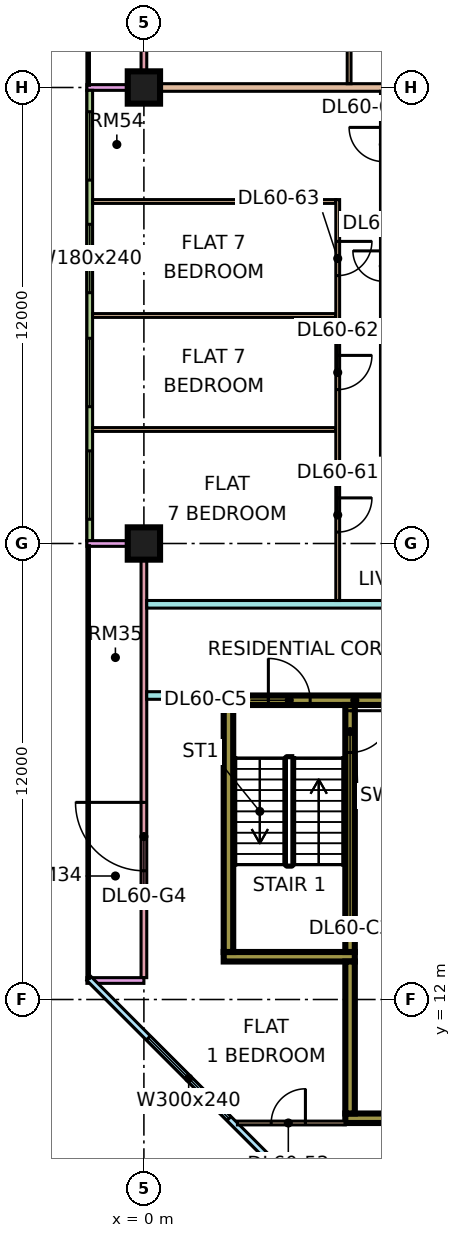
"""IFC4 building model, lengths in metres.
Left out: names, types, materials, properties, quantities, classifications, styles, units other than length and angle.
Written with IfcOpenShell. Run it as: python <this file> out.ifc"""

import sys

from ifc_helpers import new_model, si_unit, direction, frame, frame_2d, origin, origin_2d, place, context, subcontext, project, spatial, rectangle, extrude, element, fill, save


model = new_model("IFC4")
c1 = context("Model", 3, precision=1e-05, world=origin(), true_north=direction((0.0, 1.0)))
c2 = subcontext(c1, "Body", "Model", "MODEL_VIEW")
j1 = project(units=[si_unit("LENGTHUNIT", "METRE"), si_unit("PLANEANGLEUNIT", "RADIAN")], contexts=[c1])
p1 = place(None, origin())
s1 = spatial("IfcSite", under=j1, at=p1, CompositionType="ELEMENT")
p2 = place(p1, origin())
s2 = spatial("IfcBuilding", under=s1, at=p2, CompositionType="ELEMENT")
p3 = place(p2, frame((0.0, 0.0, 252.9)))
s3 = spatial("IfcBuildingStorey", under=s2, at=p3, CompositionType="ELEMENT", Elevation=252.9)
p4 = place(p3, frame((0.0, 24.0, 0.0), z_axis=(0.0, 0.0, 1.0), x_axis=(1.0, 0.0, 0.0)))
e1 = element("IfcColumn", 1, at=p4, inside=s3, PredefinedType="COLUMN", context=c2, shape_type="SweptSolid", body=[
    extrude(rectangle(XDim=0.85, YDim=0.85, at=origin_2d()), origin(), (0.0, 0.0, 1.0), 3.75),
])
p5 = place(p3, frame((0.0, 36.0, 0.0), z_axis=(0.0, 0.0, 1.0), x_axis=(1.0, 0.0, 0.0)))
e2 = element("IfcColumn", 2, at=p5, inside=s3, PredefinedType="COLUMN", context=c2, shape_type="SweptSolid", body=[
    extrude(rectangle(XDim=0.85, YDim=0.85, at=origin_2d()), origin(), (0.0, 0.0, 1.0), 3.75),
])
p6 = place(p3, frame((2.1, 19.875, 0.0), z_axis=(0.0, 0.0, 1.0), x_axis=(1.0, 0.0, 0.0)))
e3 = element("IfcWall", 3, at=p6, inside=s3, PredefinedType="SHEAR", context=c2, shape_type="SweptSolid", body=[
    extrude(rectangle(XDim=6.9, YDim=0.25, at=frame_2d((3.45, 0.0))), origin(), (0.0, 0.0, 1.0), 3.75),
])
p7 = place(p6, frame((1.175, 0.0, 0.0)))
e4 = element("IfcOpeningElement", 4, at=p7, cuts=e3, PredefinedType="OPENING", context=c2, shape_type="SweptSolid", body=[
    extrude(rectangle(XDim=1.1, YDim=2.2, at=frame_2d((0.55, 1.1))), frame((0.0, 0.135, 0.0), z_axis=(0.0, -1.0, 0.0), x_axis=(1.0, 0.0, 0.0)), (0.0, 0.0, 1.0), 0.27),
])
p8 = place(p6, frame((4.6, 0.0, 0.0)))
e5 = element("IfcOpeningElement", 5, at=p8, cuts=e3, PredefinedType="OPENING", context=c2, shape_type="SweptSolid", body=[
    extrude(rectangle(XDim=1.2, YDim=2.2, at=frame_2d((0.6, 1.1))), frame((0.0, 0.135, 0.0), z_axis=(0.0, -1.0, 0.0), x_axis=(1.0, 0.0, 0.0)), (0.0, 0.0, 1.0), 0.27),
])
p9 = place(p3, frame((2.1, 13.125, 0.0), z_axis=(0.0, 0.0, 1.0), x_axis=(1.0, 0.0, 0.0)))
e6 = element("IfcWall", 6, at=p9, inside=s3, PredefinedType="SHEAR", context=c2, shape_type="SweptSolid", body=[
    extrude(rectangle(XDim=3.45, YDim=0.25, at=frame_2d((1.725, 0.0))), origin(), (0.0, 0.0, 1.0), 3.75),
])
p10 = place(p3, frame((2.225, 13.25, 0.0), z_axis=(0.0, 0.0, 1.0), x_axis=(0.0, 1.0, 0.0)))
e7 = element("IfcWall", 7, at=p10, inside=s3, PredefinedType="SHEAR", context=c2, shape_type="SweptSolid", body=[
    extrude(rectangle(XDim=6.5, YDim=0.25, at=frame_2d((3.25, 0.0))), origin(), (0.0, 0.0, 1.0), 3.75),
])
p11 = place(p3, frame((5.425, 13.25, 0.0), z_axis=(0.0, 0.0, 1.0), x_axis=(0.0, 1.0, 0.0)))
e8 = element("IfcWall", 8, at=p11, inside=s3, PredefinedType="SHEAR", context=c2, shape_type="SweptSolid", body=[
    extrude(rectangle(XDim=6.5, YDim=0.25, at=frame_2d((3.25, 0.0))), origin(), (0.0, 0.0, 1.0), 3.75),
])
p12 = place(p11, frame((5.25, 0.0, 0.0)))
e9 = element("IfcOpeningElement", 9, at=p12, cuts=e8, PredefinedType="OPENING", context=c2, shape_type="SweptSolid", body=[
    extrude(rectangle(XDim=1.1, YDim=2.2, at=frame_2d((0.55, 1.1))), frame((0.0, 0.135, 0.0), z_axis=(0.0, -1.0, 0.0), x_axis=(1.0, 0.0, 0.0)), (0.0, 0.0, 1.0), 0.27),
])
p13 = place(p3, frame((5.3, 8.875, 0.0), z_axis=(0.0, 0.0, 1.0), x_axis=(1.0, 0.0, 0.0)))
e10 = element("IfcWall", 10, at=p13, inside=s3, PredefinedType="SHEAR", context=c2, shape_type="SweptSolid", body=[
    extrude(rectangle(XDim=3.7, YDim=0.25, at=frame_2d((1.85, 0.0))), origin(), (0.0, 0.0, 1.0), 3.75),
])
p14 = place(p3, frame((5.425, 9.0, 0.0), z_axis=(0.0, 0.0, 1.0), x_axis=(0.0, 1.0, 0.0)))
e11 = element("IfcWall", 11, at=p14, inside=s3, PredefinedType="SHEAR", context=c2, shape_type="SweptSolid", body=[
    extrude(rectangle(XDim=4.0, YDim=0.25, at=frame_2d((2.0, 0.0))), origin(), (0.0, 0.0, 1.0), 3.75),
])
p15 = place(p3, frame((0.0, 47.925, 0.0), z_axis=(0.0, 0.0, 1.0), x_axis=(0.0, -1.0, 0.0)))
e12 = element("IfcWall", 12, at=p15, inside=s3, PredefinedType="SOLIDWALL", context=c2, shape_type="SweptSolid", body=[
    extrude(rectangle(XDim=11.85, YDim=0.15, at=frame_2d((5.925, 0.0))), origin(), (0.0, 0.0, 1.0), 3.3),
])
p16 = place(p15, frame((0.6, 0.0, 0.45)))
e13 = element("IfcOpeningElement", 13, at=p16, cuts=e12, PredefinedType="OPENING", context=c2, shape_type="SweptSolid", body=[
    extrude(rectangle(XDim=1.2, YDim=2.4, at=frame_2d((0.6, 1.2))), frame((0.0, 0.085, 0.0), z_axis=(0.0, -1.0, 0.0), x_axis=(1.0, 0.0, 0.0)), (0.0, 0.0, 1.0), 0.17),
])
p17 = place(p15, frame((4.087, 0.0, 0.0)))
e14 = element("IfcOpeningElement", 14, at=p17, cuts=e12, PredefinedType="OPENING", context=c2, shape_type="SweptSolid", body=[
    extrude(rectangle(XDim=1.2, YDim=2.4, at=frame_2d((0.6, 1.2))), frame((0.0, 0.085, 0.0), z_axis=(0.0, -1.0, 0.0), x_axis=(1.0, 0.0, 0.0)), (0.0, 0.0, 1.0), 0.17),
])
p18 = place(p15, frame((6.525, 0.0, 0.45)))
e15 = element("IfcOpeningElement", 15, at=p18, cuts=e12, PredefinedType="OPENING", context=c2, shape_type="SweptSolid", body=[
    extrude(rectangle(XDim=1.8, YDim=2.4, at=frame_2d((0.9, 1.2))), frame((0.0, 0.085, 0.0), z_axis=(0.0, -1.0, 0.0), x_axis=(1.0, 0.0, 0.0)), (0.0, 0.0, 1.0), 0.17),
])
p19 = place(p15, frame((9.562, 0.0, 0.45)))
e16 = element("IfcOpeningElement", 16, at=p19, cuts=e12, PredefinedType="OPENING", context=c2, shape_type="SweptSolid", body=[
    extrude(rectangle(XDim=1.2, YDim=2.4, at=frame_2d((0.6, 1.2))), frame((0.0, 0.085, 0.0), z_axis=(0.0, -1.0, 0.0), x_axis=(1.0, 0.0, 0.0)), (0.0, 0.0, 1.0), 0.17),
])
p20 = place(p3, frame((-1.5, 36.0, 0.0), z_axis=(0.0, 0.0, 1.0), x_axis=(1.0, 0.0, 0.0)))
e17 = element("IfcWall", 17, at=p20, inside=s3, PredefinedType="SOLIDWALL", context=c2, shape_type="SweptSolid", body=[
    extrude(rectangle(XDim=1.5, YDim=0.15, at=frame_2d((0.75, 0.0))), origin(), (0.0, 0.0, 1.0), 3.3),
])
p21 = place(p3, frame((-1.425, 35.925, 0.0), z_axis=(0.0, 0.0, 1.0), x_axis=(0.0, -1.0, 0.0)))
e18 = element("IfcWall", 18, at=p21, inside=s3, PredefinedType="SOLIDWALL", context=c2, shape_type="SweptSolid", body=[
    extrude(rectangle(XDim=11.85, YDim=0.15, at=frame_2d((5.925, 0.0))), origin(), (0.0, 0.0, 1.0), 3.3),
])
p22 = place(p21, frame((0.562, 0.0, 0.45)))
e19 = element("IfcOpeningElement", 19, at=p22, cuts=e18, PredefinedType="OPENING", context=c2, shape_type="SweptSolid", body=[
    extrude(rectangle(XDim=1.8, YDim=2.4, at=frame_2d((0.9, 1.2))), frame((0.0, 0.085, 0.0), z_axis=(0.0, -1.0, 0.0), x_axis=(1.0, 0.0, 0.0)), (0.0, 0.0, 1.0), 0.17),
])
p23 = place(p21, frame((3.525, 0.0, 0.45)))
e20 = element("IfcOpeningElement", 20, at=p23, cuts=e18, PredefinedType="OPENING", context=c2, shape_type="SweptSolid", body=[
    extrude(rectangle(XDim=1.8, YDim=2.4, at=frame_2d((0.9, 1.2))), frame((0.0, 0.085, 0.0), z_axis=(0.0, -1.0, 0.0), x_axis=(1.0, 0.0, 0.0)), (0.0, 0.0, 1.0), 0.17),
])
p24 = place(p21, frame((6.525, 0.0, 0.45)))
e21 = element("IfcOpeningElement", 21, at=p24, cuts=e18, PredefinedType="OPENING", context=c2, shape_type="SweptSolid", body=[
    extrude(rectangle(XDim=1.8, YDim=2.4, at=frame_2d((0.9, 1.2))), frame((0.0, 0.085, 0.0), z_axis=(0.0, -1.0, 0.0), x_axis=(1.0, 0.0, 0.0)), (0.0, 0.0, 1.0), 0.17),
])
p25 = place(p21, frame((9.488, 0.0, 0.45)))
e22 = element("IfcOpeningElement", 22, at=p25, cuts=e18, PredefinedType="OPENING", context=c2, shape_type="SweptSolid", body=[
    extrude(rectangle(XDim=1.8, YDim=2.4, at=frame_2d((0.9, 1.2))), frame((0.0, 0.085, 0.0), z_axis=(0.0, -1.0, 0.0), x_axis=(1.0, 0.0, 0.0)), (0.0, 0.0, 1.0), 0.17),
])
p26 = place(p3, frame((0.0, 23.925, 0.0), z_axis=(0.0, 0.0, 1.0), x_axis=(0.0, -1.0, 0.0)))
e23 = element("IfcWall", 23, at=p26, inside=s3, PredefinedType="SOLIDWALL", context=c2, shape_type="SweptSolid", body=[
    extrude(rectangle(XDim=11.35, YDim=0.15, at=frame_2d((5.675, 0.0))), origin(), (0.0, 0.0, 1.0), 3.3),
])
p27 = place(p26, frame((6.738, 0.0, 0.0)))
e24 = element("IfcOpeningElement", 24, at=p27, cuts=e23, PredefinedType="OPENING", context=c2, shape_type="SweptSolid", body=[
    extrude(rectangle(XDim=1.8, YDim=2.4, at=frame_2d((0.9, 1.2))), frame((0.0, 0.085, 0.0), z_axis=(0.0, -1.0, 0.0), x_axis=(1.0, 0.0, 0.0)), (0.0, 0.0, 1.0), 0.17),
])
for number, where, z_axis, x_axis in (
    (25, (-1.5, 24.0, 0.0), (0.0, 0.0, 1.0), (1.0, 0.0, 0.0)),
    (26, (-1.5, 12.5, 0.0), (0.0, 0.0, 1.0), (1.0, 0.0, 0.0)),
):
    element("IfcWall", number, at=place(p3, frame(where, z_axis=z_axis, x_axis=x_axis)), inside=s3, PredefinedType="SOLIDWALL", context=c2, shape_type="SweptSolid", body=[
        extrude(rectangle(XDim=1.5, YDim=0.15, at=frame_2d((0.75, 0.0))), origin(), (0.0, 0.0, 1.0), 3.3),
    ])
p28 = place(p3, frame((-1.447, 12.553, 0.0), z_axis=(0.0, 0.0, 1.0), x_axis=(0.707106781187, -0.707106781187, 0.0)))
e27 = element("IfcWall", 27, at=p28, inside=s3, PredefinedType="SOLIDWALL", context=c2, shape_type="SweptSolid", body=[
    extrude(rectangle(XDim=19.799, YDim=0.15, at=frame_2d((9.899, 0.0))), origin(), (0.0, 0.0, 1.0), 3.3),
])
p29 = place(p28, frame((2.212, 0.0, 0.45)))
e28 = element("IfcOpeningElement", 28, at=p29, cuts=e27, PredefinedType="OPENING", context=c2, shape_type="SweptSolid", body=[
    extrude(rectangle(XDim=3.0, YDim=2.4, at=frame_2d((1.5, 1.2))), frame((0.0, 0.085, 0.0), z_axis=(0.0, -1.0, 0.0), x_axis=(1.0, 0.0, 0.0)), (0.0, 0.0, 1.0), 0.17),
])
p30 = place(p28, frame((10.216, 0.0, 0.45)))
e29 = element("IfcOpeningElement", 29, at=p30, cuts=e27, PredefinedType="OPENING", context=c2, shape_type="SweptSolid", body=[
    extrude(rectangle(XDim=3.0, YDim=2.4, at=frame_2d((1.5, 1.2))), frame((0.0, 0.085, 0.0), z_axis=(0.0, -1.0, 0.0), x_axis=(1.0, 0.0, 0.0)), (0.0, 0.0, 1.0), 0.17),
])
for number, where, z_axis, x_axis in (
    (30, (-1.351, 27.0, 0.0), (0.0, 0.0, 1.0), (1.0, 0.0, 0.0)),
    (31, (-1.351, 30.0, 0.0), (0.0, 0.0, 1.0), (1.0, 0.0, 0.0)),
):
    element("IfcWall", number, at=place(p3, frame(where, z_axis=z_axis, x_axis=x_axis)), inside=s3, PredefinedType="PARTITIONING", context=c2, shape_type="SweptSolid", body=[
        extrude(rectangle(XDim=6.401, YDim=0.1, at=frame_2d((3.201, 0.0))), origin(), (0.0, 0.0, 1.0), 3.3),
    ])
p31 = place(p3, frame((-1.35, 33.0, 0.0), z_axis=(0.0, 0.0, 1.0), x_axis=(1.0, 0.0, 0.0)))
e32 = element("IfcWall", 32, at=p31, inside=s3, PredefinedType="PARTITIONING", context=c2, shape_type="SweptSolid", body=[
    extrude(rectangle(XDim=6.4, YDim=0.1, at=frame_2d((3.2, 0.0))), origin(), (0.0, 0.0, 1.0), 3.3),
])
e33 = element("IfcWall", 33, at=p5, inside=s3, PredefinedType="PARTITIONING", context=c2, shape_type="SweptSolid", body=[
    extrude(rectangle(XDim=6.375, YDim=0.2, at=frame_2d((3.188, 0.0))), origin(), (0.0, 0.0, 1.0), 3.3),
])
p32 = place(p3, frame((0.074, 20.0, 0.0), z_axis=(0.0, 0.0, 1.0), x_axis=(1.0, 0.0, 0.0)))
e34 = element("IfcWall", 34, at=p32, inside=s3, PredefinedType="PARTITIONING", context=c2, shape_type="SweptSolid", body=[
    extrude(rectangle(XDim=2.026, YDim=0.2, at=frame_2d((1.013, 0.0))), origin(), (0.0, 0.0, 1.0), 3.3),
])
p33 = place(p3, frame((0.074, 22.4, 0.0), z_axis=(0.0, 0.0, 1.0), x_axis=(1.0, 0.0, 0.0)))
e35 = element("IfcWall", 35, at=p33, inside=s3, PredefinedType="PARTITIONING", context=c2, shape_type="SweptSolid", body=[
    extrude(rectangle(XDim=9.426, YDim=0.2, at=frame_2d((4.713, 0.0))), origin(), (0.0, 0.0, 1.0), 3.3),
])
p34 = place(p3, frame((2.461, 8.75, 0.0), z_axis=(0.0, 0.0, 1.0), x_axis=(1.0, 0.0, 0.0)))
e36 = element("IfcWall", 36, at=p34, inside=s3, PredefinedType="PARTITIONING", context=c2, shape_type="SweptSolid", body=[
    extrude(rectangle(XDim=2.839, YDim=0.1, at=frame_2d((1.419, 0.0))), origin(), (0.0, 0.0, 1.0), 3.3),
])
p35 = place(p34, frame((0.889, 0.0, 0.0)))
e37 = element("IfcOpeningElement", 37, at=p35, cuts=e36, PredefinedType="OPENING", context=c2, shape_type="SweptSolid", body=[
    extrude(rectangle(XDim=0.9, YDim=2.1, at=frame_2d((0.45, 1.05))), frame((0.0, 0.06, 0.0), z_axis=(0.0, -1.0, 0.0), x_axis=(1.0, 0.0, 0.0)), (0.0, 0.0, 1.0), 0.12),
])
p36 = place(p3, frame((5.1, 22.5, 0.0), z_axis=(0.0, 0.0, 1.0), x_axis=(0.0, 1.0, 0.0)))
e38 = element("IfcWall", 38, at=p36, inside=s3, PredefinedType="PARTITIONING", context=c2, shape_type="SweptSolid", body=[
    extrude(rectangle(XDim=10.55, YDim=0.1, at=frame_2d((5.275, 0.0))), origin(), (0.0, 0.0, 1.0), 3.3),
])
p37 = place(p36, frame((1.8, 0.0, 0.0)))
e39 = element("IfcOpeningElement", 39, at=p37, cuts=e38, PredefinedType="OPENING", context=c2, shape_type="SweptSolid", body=[
    extrude(rectangle(XDim=0.9, YDim=2.1, at=frame_2d((0.45, 1.05))), frame((0.0, 0.06, 0.0), z_axis=(0.0, -1.0, 0.0), x_axis=(1.0, 0.0, 0.0)), (0.0, 0.0, 1.0), 0.12),
])
p38 = place(p36, frame((5.55, 0.0, 0.0)))
e40 = element("IfcOpeningElement", 40, at=p38, cuts=e38, PredefinedType="OPENING", context=c2, shape_type="SweptSolid", body=[
    extrude(rectangle(XDim=0.9, YDim=2.1, at=frame_2d((0.45, 1.05))), frame((0.0, 0.06, 0.0), z_axis=(0.0, -1.0, 0.0), x_axis=(1.0, 0.0, 0.0)), (0.0, 0.0, 1.0), 0.12),
])
p39 = place(p36, frame((8.55, 0.0, 0.0)))
e41 = element("IfcOpeningElement", 41, at=p39, cuts=e38, PredefinedType="OPENING", context=c2, shape_type="SweptSolid", body=[
    extrude(rectangle(XDim=0.9, YDim=2.1, at=frame_2d((0.45, 1.05))), frame((0.0, 0.06, 0.0), z_axis=(0.0, -1.0, 0.0), x_axis=(1.0, 0.0, 0.0)), (0.0, 0.0, 1.0), 0.12),
])
p40 = place(p3, frame((5.4, 36.1, 0.0), z_axis=(0.0, 0.0, 1.0), x_axis=(0.0, 1.0, 0.0)))
e42 = element("IfcWall", 42, at=p40, inside=s3, PredefinedType="PARTITIONING", context=c2, shape_type="SweptSolid", body=[
    extrude(rectangle(XDim=26.95, YDim=0.1, at=frame_2d((13.475, 0.0))), origin(), (0.0, 0.0, 1.0), 3.3),
])
p41 = place(p40, frame((0.95, 0.0, 0.0)))
e43 = element("IfcOpeningElement", 43, at=p41, cuts=e42, PredefinedType="OPENING", context=c2, shape_type="SweptSolid", body=[
    extrude(rectangle(XDim=0.9, YDim=2.1, at=frame_2d((0.45, 1.05))), frame((0.0, 0.06, 0.0), z_axis=(0.0, -1.0, 0.0), x_axis=(1.0, 0.0, 0.0)), (0.0, 0.0, 1.0), 0.12),
])
p42 = place(p40, frame((3.95, 0.0, 0.0)))
e44 = element("IfcOpeningElement", 44, at=p42, cuts=e42, PredefinedType="OPENING", context=c2, shape_type="SweptSolid", body=[
    extrude(rectangle(XDim=0.9, YDim=2.1, at=frame_2d((0.45, 1.05))), frame((0.0, 0.06, 0.0), z_axis=(0.0, -1.0, 0.0), x_axis=(1.0, 0.0, 0.0)), (0.0, 0.0, 1.0), 0.12),
])
p43 = place(p40, frame((6.95, 0.0, 0.0)))
e45 = element("IfcOpeningElement", 45, at=p43, cuts=e42, PredefinedType="OPENING", context=c2, shape_type="SweptSolid", body=[
    extrude(rectangle(XDim=0.9, YDim=2.1, at=frame_2d((0.45, 1.05))), frame((0.0, 0.06, 0.0), z_axis=(0.0, -1.0, 0.0), x_axis=(1.0, 0.0, 0.0)), (0.0, 0.0, 1.0), 0.12),
])
p44 = place(p40, frame((9.95, 0.0, 0.0)))
e46 = element("IfcOpeningElement", 46, at=p44, cuts=e42, PredefinedType="OPENING", context=c2, shape_type="SweptSolid", body=[
    extrude(rectangle(XDim=0.9, YDim=2.1, at=frame_2d((0.45, 1.05))), frame((0.0, 0.06, 0.0), z_axis=(0.0, -1.0, 0.0), x_axis=(1.0, 0.0, 0.0)), (0.0, 0.0, 1.0), 0.12),
])
p45 = place(p40, frame((21.95, 0.0, 0.0)))
e47 = element("IfcOpeningElement", 47, at=p45, cuts=e42, PredefinedType="OPENING", context=c2, shape_type="SweptSolid", body=[
    extrude(rectangle(XDim=0.9, YDim=2.1, at=frame_2d((0.45, 1.05))), frame((0.0, 0.06, 0.0), z_axis=(0.0, -1.0, 0.0), x_axis=(1.0, 0.0, 0.0)), (0.0, 0.0, 1.0), 0.12),
])
p46 = place(p40, frame((24.95, 0.0, 0.0)))
e48 = element("IfcOpeningElement", 48, at=p46, cuts=e42, PredefinedType="OPENING", context=c2, shape_type="SweptSolid", body=[
    extrude(rectangle(XDim=0.9, YDim=2.1, at=frame_2d((0.45, 1.05))), frame((0.0, 0.06, 0.0), z_axis=(0.0, -1.0, 0.0), x_axis=(1.0, 0.0, 0.0)), (0.0, 0.0, 1.0), 0.12),
])
p47 = place(p40, frame((15.95, 0.0, 0.0)))
e49 = element("IfcOpeningElement", 49, at=p47, cuts=e42, PredefinedType="OPENING", context=c2, shape_type="SweptSolid", body=[
    extrude(rectangle(XDim=0.9, YDim=2.1, at=frame_2d((0.45, 1.05))), frame((0.0, 0.06, 0.0), z_axis=(0.0, -1.0, 0.0), x_axis=(1.0, 0.0, 0.0)), (0.0, 0.0, 1.0), 0.12),
])
p48 = place(p22, origin())
e50 = element("IfcWindow", 50, at=p48, inside=s3, PartitioningType="SINGLE_PANEL", PredefinedType="WINDOW", context=c2, shape_type="SweptSolid", body=[
    extrude(rectangle(XDim=1.8, YDim=2.4, at=frame_2d((0.9, 1.2))), frame((0.0, 0.03, 0.0), z_axis=(0.0, -1.0, 0.0), x_axis=(1.0, 0.0, 0.0)), (0.0, 0.0, 1.0), 0.06),
])
fill(e19, e50)
p49 = place(p23, origin())
e51 = element("IfcWindow", 51, at=p49, inside=s3, PartitioningType="SINGLE_PANEL", PredefinedType="WINDOW", context=c2, shape_type="SweptSolid", body=[
    extrude(rectangle(XDim=1.8, YDim=2.4, at=frame_2d((0.9, 1.2))), frame((0.0, 0.03, 0.0), z_axis=(0.0, -1.0, 0.0), x_axis=(1.0, 0.0, 0.0)), (0.0, 0.0, 1.0), 0.06),
])
fill(e20, e51)
p50 = place(p24, origin())
e52 = element("IfcWindow", 52, at=p50, inside=s3, PartitioningType="SINGLE_PANEL", PredefinedType="WINDOW", context=c2, shape_type="SweptSolid", body=[
    extrude(rectangle(XDim=1.8, YDim=2.4, at=frame_2d((0.9, 1.2))), frame((0.0, 0.03, 0.0), z_axis=(0.0, -1.0, 0.0), x_axis=(1.0, 0.0, 0.0)), (0.0, 0.0, 1.0), 0.06),
])
fill(e21, e52)
p51 = place(p25, origin())
e53 = element("IfcWindow", 53, at=p51, inside=s3, PartitioningType="SINGLE_PANEL", PredefinedType="WINDOW", context=c2, shape_type="SweptSolid", body=[
    extrude(rectangle(XDim=1.8, YDim=2.4, at=frame_2d((0.9, 1.2))), frame((0.0, 0.03, 0.0), z_axis=(0.0, -1.0, 0.0), x_axis=(1.0, 0.0, 0.0)), (0.0, 0.0, 1.0), 0.06),
])
fill(e22, e53)
p52 = place(p27, frame((1.8, 0.0, 0.0), z_axis=(0.0, 0.0, 1.0), x_axis=(-1.0, 0.0, 0.0)))
e54 = element("IfcDoor", 54, at=p52, inside=s3, OperationType="DOUBLE_DOOR_SINGLE_SWING", PredefinedType="DOOR", context=c2, shape_type="SweptSolid", body=[
    extrude(rectangle(XDim=1.8, YDim=2.4, at=frame_2d((0.9, 1.2))), frame((0.0, 0.025, 0.0), z_axis=(0.0, -1.0, 0.0), x_axis=(1.0, 0.0, 0.0)), (0.0, 0.0, 1.0), 0.05),
])
fill(e24, e54)
p53 = place(p29, origin())
e55 = element("IfcWindow", 55, at=p53, inside=s3, PartitioningType="SINGLE_PANEL", PredefinedType="WINDOW", context=c2, shape_type="SweptSolid", body=[
    extrude(rectangle(XDim=3.0, YDim=2.4, at=frame_2d((1.5, 1.2))), frame((0.0, 0.03, 0.0), z_axis=(0.0, -1.0, 0.0), x_axis=(1.0, 0.0, 0.0)), (0.0, 0.0, 1.0), 0.06),
])
fill(e28, e55)
p54 = place(p12, origin())
e56 = element("IfcDoor", 56, at=p54, inside=s3, OperationType="SINGLE_SWING_RIGHT", PredefinedType="DOOR", context=c2, shape_type="SweptSolid", body=[
    extrude(rectangle(XDim=1.1, YDim=2.2, at=frame_2d((0.55, 1.1))), frame((0.0, 0.025, 0.0), z_axis=(0.0, -1.0, 0.0), x_axis=(1.0, 0.0, 0.0)), (0.0, 0.0, 1.0), 0.05),
])
fill(e9, e56)
p55 = place(p7, origin())
e57 = element("IfcDoor", 57, at=p55, inside=s3, OperationType="SINGLE_SWING_LEFT", PredefinedType="DOOR", context=c2, shape_type="SweptSolid", body=[
    extrude(rectangle(XDim=1.1, YDim=2.2, at=frame_2d((0.55, 1.1))), frame((0.0, 0.025, 0.0), z_axis=(0.0, -1.0, 0.0), x_axis=(1.0, 0.0, 0.0)), (0.0, 0.0, 1.0), 0.05),
])
fill(e4, e57)
p56 = place(p35, frame((0.9, 0.0, 0.0), z_axis=(0.0, 0.0, 1.0), x_axis=(-1.0, 0.0, 0.0)))
e58 = element("IfcDoor", 58, at=p56, inside=s3, OperationType="SINGLE_SWING_RIGHT", PredefinedType="DOOR", context=c2, shape_type="SweptSolid", body=[
    extrude(rectangle(XDim=0.9, YDim=2.1, at=frame_2d((0.45, 1.05))), frame((0.0, 0.025, 0.0), z_axis=(0.0, -1.0, 0.0), x_axis=(1.0, 0.0, 0.0)), (0.0, 0.0, 1.0), 0.05),
])
fill(e37, e58)
p57 = place(p37, origin())
e59 = element("IfcDoor", 59, at=p57, inside=s3, OperationType="SINGLE_SWING_RIGHT", PredefinedType="DOOR", context=c2, shape_type="SweptSolid", body=[
    extrude(rectangle(XDim=0.9, YDim=2.1, at=frame_2d((0.45, 1.05))), frame((0.0, 0.025, 0.0), z_axis=(0.0, -1.0, 0.0), x_axis=(1.0, 0.0, 0.0)), (0.0, 0.0, 1.0), 0.05),
])
fill(e39, e59)
p58 = place(p38, origin())
e60 = element("IfcDoor", 60, at=p58, inside=s3, OperationType="SINGLE_SWING_RIGHT", PredefinedType="DOOR", context=c2, shape_type="SweptSolid", body=[
    extrude(rectangle(XDim=0.9, YDim=2.1, at=frame_2d((0.45, 1.05))), frame((0.0, 0.025, 0.0), z_axis=(0.0, -1.0, 0.0), x_axis=(1.0, 0.0, 0.0)), (0.0, 0.0, 1.0), 0.05),
])
fill(e40, e60)
p59 = place(p39, origin())
e61 = element("IfcDoor", 61, at=p59, inside=s3, OperationType="SINGLE_SWING_RIGHT", PredefinedType="DOOR", context=c2, shape_type="SweptSolid", body=[
    extrude(rectangle(XDim=0.9, YDim=2.1, at=frame_2d((0.45, 1.05))), frame((0.0, 0.025, 0.0), z_axis=(0.0, -1.0, 0.0), x_axis=(1.0, 0.0, 0.0)), (0.0, 0.0, 1.0), 0.05),
])
fill(e41, e61)
save(model, sys.argv[1])
